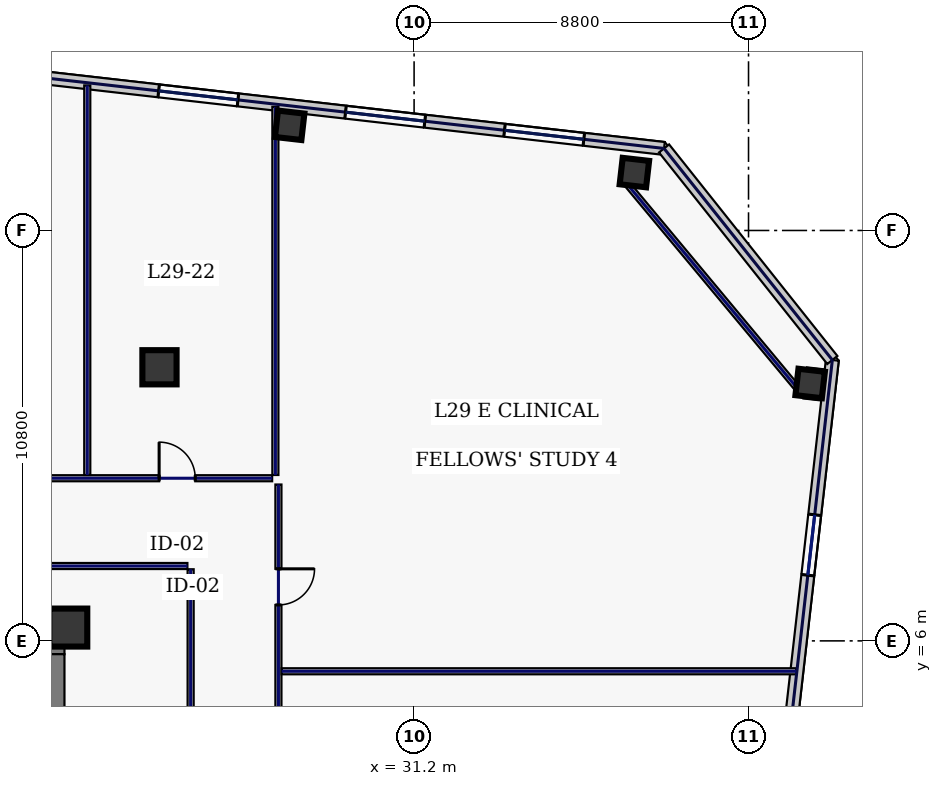
"""IFC4 building model, lengths in metres.
Left out: names, types, materials, properties, quantities, classifications, styles, units other than length and angle.
Written with IfcOpenShell. Run it as: python <this file> out.ifc"""

import sys

from ifc_helpers import new_model, si_unit, direction, frame, frame_2d, origin, origin_2d, place, context, subcontext, project, spatial, rectangle, hollow_rectangle, extrude, element, fill, save


model = new_model("IFC4")
c1 = context("Model", 3, precision=1e-05, world=origin(), true_north=direction((0.0, 1.0)))
c2 = subcontext(c1, "Body", "Model", "MODEL_VIEW")
j1 = project(units=[si_unit("LENGTHUNIT", "METRE"), si_unit("PLANEANGLEUNIT", "RADIAN")], contexts=[c1])
p1 = place(None, origin())
s1 = spatial("IfcSite", under=j1, at=p1, CompositionType="ELEMENT")
p2 = place(p1, origin())
s2 = spatial("IfcBuilding", under=s1, at=p2, CompositionType="ELEMENT")
p3 = place(p2, frame((0.0, 0.0, 129.4)))
s3 = spatial("IfcBuildingStorey", under=s2, at=p3, CompositionType="ELEMENT", Elevation=129.4)
p4 = place(p3, frame((10.45, 6.0, 0.0), z_axis=(0.0, 0.0, 1.0), x_axis=(1.0, 0.0, 0.0)))
e1 = element("IfcWall", 1, at=p4, inside=s3, PredefinedType="SHEAR", context=c2, shape_type="SweptSolid", body=[
    extrude(rectangle(XDim=11.55, YDim=0.7, at=frame_2d((5.775, 0.0))), origin(), (0.0, 0.0, 1.0), 3.74),
])
p5 = place(p3, frame((21.6, -5.65, 0.0), z_axis=(0.0, 0.0, 1.0), x_axis=(0.0, 1.0, 0.0)))
e2 = element("IfcWall", 2, at=p5, inside=s3, PredefinedType="SHEAR", context=c2, shape_type="SweptSolid", body=[
    extrude(rectangle(XDim=11.3, YDim=0.8, at=frame_2d((5.65, 0.0))), origin(), (0.0, 0.0, 1.0), 3.74),
])
p6 = place(p3, frame((22.1, 6.35, 0.0), z_axis=(0.0, 0.0, 1.0), x_axis=(1.0, 0.0, 0.0)))
e3 = element("IfcColumn", 3, at=p6, inside=s3, PredefinedType="COLUMN", context=c2, shape_type="SweptSolid", body=[
    extrude(hollow_rectangle(XDim=1.0, YDim=1.0, WallThickness=0.045, at=origin_2d()), origin(), (0.0, 0.0, 1.0), 3.74),
])
p7 = place(p3, frame((24.5, 13.2, 0.0), z_axis=(0.0, 0.0, 1.0), x_axis=(1.0, 0.0, 0.0)))
e4 = element("IfcColumn", 4, at=p7, inside=s3, PredefinedType="COLUMN", context=c2, shape_type="SweptSolid", body=[
    extrude(hollow_rectangle(XDim=0.9, YDim=0.9, WallThickness=0.04, at=origin_2d()), origin(), (0.0, 0.0, 1.0), 3.74),
])
for number, where, z_axis, x_axis in (
    (5, (36.997, 18.323, 0.0), (0.0, 0.0, 1.0), (0.994, -0.113, 0.0)),
    (6, (27.926, 19.568, 0.0), (0.0, 0.0, 1.0), (0.994, -0.113, 0.0)),
    (7, (41.622, 12.774, 0.0), (0.0, 0.0, 1.0), (0.994, -0.113, 0.0)),
):
    element("IfcColumn", number, at=place(p3, frame(where, z_axis=z_axis, x_axis=x_axis)), inside=s3, PredefinedType="COLUMN", context=c2, shape_type="SweptSolid", body=[
        extrude(hollow_rectangle(XDim=0.7, YDim=0.7, WallThickness=0.032, at=origin_2d()), origin(), (0.0, 0.0, 1.0), 3.74),
    ])
p8 = place(p3, frame((37.777, 18.958, 0.0), z_axis=(0.0, 0.0, 1.0), x_axis=(-0.993571362037, 0.113207546299, 0.0)))
e8 = element("IfcWall", 8, at=p8, inside=s3, PredefinedType="STANDARD", context=c2, shape_type="SweptSolid", body=[
    extrude(rectangle(XDim=21.223, YDim=0.34, at=frame_2d((10.611, 0.0))), origin(), (0.0, 0.0, 1.0), 3.74),
])
p9 = place(p8, frame((16.756, 0.0, 0.67)))
e9 = element("IfcOpeningElement", 9, at=p9, cuts=e8, PredefinedType="OPENING", context=c2, shape_type="SweptSolid", body=[
    extrude(rectangle(XDim=0.85, YDim=1.85, at=frame_2d((0.425, 0.925))), frame((0.0, 0.18, 0.0), z_axis=(0.0, -1.0, 0.0), x_axis=(1.0, 0.0, 0.0)), (0.0, 0.0, 1.0), 0.36),
])
p10 = place(p8, frame((11.285, 0.0, 0.67)))
e10 = element("IfcOpeningElement", 10, at=p10, cuts=e8, PredefinedType="OPENING", context=c2, shape_type="SweptSolid", body=[
    extrude(rectangle(XDim=2.1, YDim=2.2, at=frame_2d((1.05, 1.1))), frame((0.0, 0.18, 0.0), z_axis=(0.0, -1.0, 0.0), x_axis=(1.0, 0.0, 0.0)), (0.0, 0.0, 1.0), 0.36),
])
p11 = place(p8, frame((6.336, 0.0, 0.67)))
e11 = element("IfcOpeningElement", 11, at=p11, cuts=e8, PredefinedType="OPENING", context=c2, shape_type="SweptSolid", body=[
    extrude(rectangle(XDim=2.1, YDim=2.2, at=frame_2d((1.05, 1.1))), frame((0.0, 0.18, 0.0), z_axis=(0.0, -1.0, 0.0), x_axis=(1.0, 0.0, 0.0)), (0.0, 0.0, 1.0), 0.36),
])
p12 = place(p8, frame((2.125, 0.0, 0.67)))
e12 = element("IfcOpeningElement", 12, at=p12, cuts=e8, PredefinedType="OPENING", context=c2, shape_type="SweptSolid", body=[
    extrude(rectangle(XDim=2.1, YDim=2.2, at=frame_2d((1.05, 1.1))), frame((0.0, 0.18, 0.0), z_axis=(0.0, -1.0, 0.0), x_axis=(1.0, 0.0, 0.0)), (0.0, 0.0, 1.0), 0.36),
])
p13 = place(p3, frame((37.768, -25.556, 0.0), z_axis=(0.0, 0.0, 1.0), x_axis=(0.113201605824, 0.993572038877, 0.0)))
e13 = element("IfcWall", 13, at=p13, inside=s3, PredefinedType="STANDARD", context=c2, shape_type="SweptSolid", body=[
    extrude(rectangle(XDim=39.2, YDim=0.34, at=frame_2d((19.6, 0.0))), origin(), (0.0, 0.0, 1.0), 3.74),
])
p14 = place(p13, frame((4.1, 0.0, 0.58)))
e14 = element("IfcOpeningElement", 14, at=p14, cuts=e13, PredefinedType="OPENING", context=c2, shape_type="SweptSolid", body=[
    extrude(rectangle(XDim=1.6, YDim=2.3, at=frame_2d((0.8, 1.15))), frame((0.0, 0.18, 0.0), z_axis=(0.0, -1.0, 0.0), x_axis=(1.0, 0.0, 0.0)), (0.0, 0.0, 1.0), 0.36),
])
p15 = place(p13, frame((13.9, 0.0, 0.58)))
e15 = element("IfcOpeningElement", 15, at=p15, cuts=e13, PredefinedType="OPENING", context=c2, shape_type="SweptSolid", body=[
    extrude(rectangle(XDim=1.6, YDim=2.3, at=frame_2d((0.8, 1.15))), frame((0.0, 0.18, 0.0), z_axis=(0.0, -1.0, 0.0), x_axis=(1.0, 0.0, 0.0)), (0.0, 0.0, 1.0), 0.36),
])
p16 = place(p13, frame((23.35, 0.0, 0.75)))
e16 = element("IfcOpeningElement", 16, at=p16, cuts=e13, PredefinedType="OPENING", context=c2, shape_type="SweptSolid", body=[
    extrude(rectangle(XDim=0.85, YDim=1.85, at=frame_2d((0.425, 0.925))), frame((0.0, 0.18, 0.0), z_axis=(0.0, -1.0, 0.0), x_axis=(1.0, 0.0, 0.0)), (0.0, 0.0, 1.0), 0.36),
])
p17 = place(p13, frame((33.5, 0.0, 0.58)))
e17 = element("IfcOpeningElement", 17, at=p17, cuts=e13, PredefinedType="OPENING", context=c2, shape_type="SweptSolid", body=[
    extrude(rectangle(XDim=1.6, YDim=2.3, at=frame_2d((0.8, 1.15))), frame((0.0, 0.18, 0.0), z_axis=(0.0, -1.0, 0.0), x_axis=(1.0, 0.0, 0.0)), (0.0, 0.0, 1.0), 0.36),
])
p18 = place(p3, frame((42.206, 13.392, 0.0), z_axis=(0.0, 0.0, 1.0), x_axis=(-0.622524521309, 0.782600294128, 0.0)))
e18 = element("IfcWall", 18, at=p18, inside=s3, PredefinedType="STANDARD", context=c2, shape_type="SweptSolid", body=[
    extrude(rectangle(XDim=7.113, YDim=0.34, at=frame_2d((3.557, 0.0))), origin(), (0.0, 0.0, 1.0), 3.74),
])
p19 = place(p3, frame((41.361, 12.556, 0.0), z_axis=(0.0, 0.0, 1.0), x_axis=(-0.640217638562, 0.768193579298, 0.0)))
e19 = element("IfcWall", 19, at=p19, inside=s3, PredefinedType="PARTITIONING", context=c2, shape_type="SweptSolid", body=[
    extrude(rectangle(XDim=7.224, YDim=0.16, at=frame_2d((3.612, 0.0))), origin(), (0.0, 0.0, 1.0), 3.74),
])
p20 = place(p3, frame((-27.465, 10.28, 0.0), z_axis=(0.0, 0.0, 1.0), x_axis=(1.0, 0.0, 0.0)))
e20 = element("IfcWall", 20, at=p20, inside=s3, PredefinedType="PARTITIONING", context=c2, shape_type="SweptSolid", body=[
    extrude(rectangle(XDim=54.93, YDim=0.16, at=frame_2d((27.465, 0.0))), origin(), (0.0, 0.0, 1.0), 3.74),
])
p21 = place(p20, frame((1.869, 0.0, 0.0)))
e21 = element("IfcOpeningElement", 21, at=p21, cuts=e20, PredefinedType="OPENING", context=c2, shape_type="SweptSolid", body=[
    extrude(rectangle(XDim=1.3, YDim=2.2, at=frame_2d((0.65, 1.1))), frame((0.0, 0.09, 0.0), z_axis=(0.0, -1.0, 0.0), x_axis=(1.0, 0.0, 0.0)), (0.0, 0.0, 1.0), 0.18),
])
p22 = place(p20, frame((7.1, 0.0, 0.0)))
e22 = element("IfcOpeningElement", 22, at=p22, cuts=e20, PredefinedType="OPENING", context=c2, shape_type="SweptSolid", body=[
    extrude(rectangle(XDim=0.95, YDim=2.2, at=frame_2d((0.475, 1.1))), frame((0.0, 0.09, 0.0), z_axis=(0.0, -1.0, 0.0), x_axis=(1.0, 0.0, 0.0)), (0.0, 0.0, 1.0), 0.18),
])
p23 = place(p20, frame((12.5, 0.0, 0.0)))
e23 = element("IfcOpeningElement", 23, at=p23, cuts=e20, PredefinedType="OPENING", context=c2, shape_type="SweptSolid", body=[
    extrude(rectangle(XDim=0.95, YDim=2.2, at=frame_2d((0.475, 1.1))), frame((0.0, 0.09, 0.0), z_axis=(0.0, -1.0, 0.0), x_axis=(1.0, 0.0, 0.0)), (0.0, 0.0, 1.0), 0.18),
])
p24 = place(p20, frame((18.325, 0.0, 0.0)))
e24 = element("IfcOpeningElement", 24, at=p24, cuts=e20, PredefinedType="OPENING", context=c2, shape_type="SweptSolid", body=[
    extrude(rectangle(XDim=0.95, YDim=2.2, at=frame_2d((0.475, 1.1))), frame((0.0, 0.09, 0.0), z_axis=(0.0, -1.0, 0.0), x_axis=(1.0, 0.0, 0.0)), (0.0, 0.0, 1.0), 0.18),
])
p25 = place(p20, frame((24.575, 0.0, 0.0)))
e25 = element("IfcOpeningElement", 25, at=p25, cuts=e20, PredefinedType="OPENING", context=c2, shape_type="SweptSolid", body=[
    extrude(rectangle(XDim=0.95, YDim=2.2, at=frame_2d((0.475, 1.1))), frame((0.0, 0.09, 0.0), z_axis=(0.0, -1.0, 0.0), x_axis=(1.0, 0.0, 0.0)), (0.0, 0.0, 1.0), 0.18),
])
p26 = place(p20, frame((30.69, 0.0, 0.0)))
e26 = element("IfcOpeningElement", 26, at=p26, cuts=e20, PredefinedType="OPENING", context=c2, shape_type="SweptSolid", body=[
    extrude(rectangle(XDim=1.3, YDim=2.2, at=frame_2d((0.65, 1.1))), frame((0.0, 0.09, 0.0), z_axis=(0.0, -1.0, 0.0), x_axis=(1.0, 0.0, 0.0)), (0.0, 0.0, 1.0), 0.18),
])
p27 = place(p20, frame((37.02, 0.0, 0.0)))
e27 = element("IfcOpeningElement", 27, at=p27, cuts=e20, PredefinedType="OPENING", context=c2, shape_type="SweptSolid", body=[
    extrude(rectangle(XDim=1.3, YDim=2.2, at=frame_2d((0.65, 1.1))), frame((0.0, 0.09, 0.0), z_axis=(0.0, -1.0, 0.0), x_axis=(1.0, 0.0, 0.0)), (0.0, 0.0, 1.0), 0.18),
])
p28 = place(p20, frame((44.73, 0.0, 0.0)))
e28 = element("IfcOpeningElement", 28, at=p28, cuts=e20, PredefinedType="OPENING", context=c2, shape_type="SweptSolid", body=[
    extrude(rectangle(XDim=1.3, YDim=2.2, at=frame_2d((0.65, 1.1))), frame((0.0, 0.09, 0.0), z_axis=(0.0, -1.0, 0.0), x_axis=(1.0, 0.0, 0.0)), (0.0, 0.0, 1.0), 0.18),
])
p29 = place(p20, frame((51.956, 0.0, 0.0)))
e29 = element("IfcOpeningElement", 29, at=p29, cuts=e20, PredefinedType="OPENING", context=c2, shape_type="SweptSolid", body=[
    extrude(rectangle(XDim=0.95, YDim=2.2, at=frame_2d((0.475, 1.1))), frame((0.0, 0.09, 0.0), z_axis=(0.0, -1.0, 0.0), x_axis=(1.0, 0.0, 0.0)), (0.0, 0.0, 1.0), 0.18),
])
p30 = place(p3, frame((27.63, 10.115, 0.0), z_axis=(0.0, 0.0, 1.0), x_axis=(0.0, -1.0, 0.0)))
e30 = element("IfcWall", 30, at=p30, inside=s3, PredefinedType="PARTITIONING", context=c2, shape_type="SweptSolid", body=[
    extrude(rectangle(XDim=20.13, YDim=0.16, at=frame_2d((10.065, 0.0))), origin(), (0.0, 0.0, 1.0), 3.74),
])
p31 = place(p30, frame((17.181, 0.0, 0.0)))
e31 = element("IfcOpeningElement", 31, at=p31, cuts=e30, PredefinedType="OPENING", context=c2, shape_type="SweptSolid", body=[
    extrude(rectangle(XDim=0.95, YDim=2.2, at=frame_2d((0.475, 1.1))), frame((0.0, 0.09, 0.0), z_axis=(0.0, -1.0, 0.0), x_axis=(1.0, 0.0, 0.0)), (0.0, 0.0, 1.0), 0.18),
])
p32 = place(p30, frame((12.325, 0.0, 0.0)))
e32 = element("IfcOpeningElement", 32, at=p32, cuts=e30, PredefinedType="OPENING", context=c2, shape_type="SweptSolid", body=[
    extrude(rectangle(XDim=0.95, YDim=2.2, at=frame_2d((0.475, 1.1))), frame((0.0, 0.09, 0.0), z_axis=(0.0, -1.0, 0.0), x_axis=(1.0, 0.0, 0.0)), (0.0, 0.0, 1.0), 0.18),
])
p33 = place(p30, frame((7.125, 0.0, 0.0)))
e33 = element("IfcOpeningElement", 33, at=p33, cuts=e30, PredefinedType="OPENING", context=c2, shape_type="SweptSolid", body=[
    extrude(rectangle(XDim=0.95, YDim=2.2, at=frame_2d((0.475, 1.1))), frame((0.0, 0.09, 0.0), z_axis=(0.0, -1.0, 0.0), x_axis=(1.0, 0.0, 0.0)), (0.0, 0.0, 1.0), 0.18),
])
p34 = place(p30, frame((2.219, 0.0, 0.0)))
e34 = element("IfcOpeningElement", 34, at=p34, cuts=e30, PredefinedType="OPENING", context=c2, shape_type="SweptSolid", body=[
    extrude(rectangle(XDim=0.95, YDim=2.2, at=frame_2d((0.475, 1.1))), frame((0.0, 0.09, 0.0), z_axis=(0.0, -1.0, 0.0), x_axis=(1.0, 0.0, 0.0)), (0.0, 0.0, 1.0), 0.18),
])
p35 = place(p3, frame((25.235, 7.97, 0.0), z_axis=(0.0, 0.0, 1.0), x_axis=(-1.0, 0.0, 0.0)))
e35 = element("IfcWall", 35, at=p35, inside=s3, PredefinedType="PARTITIONING", context=c2, shape_type="SweptSolid", body=[
    extrude(rectangle(XDim=14.57, YDim=0.16, at=frame_2d((7.285, 0.0))), origin(), (0.0, 0.0, 1.0), 3.74),
])
p36 = place(p3, frame((25.32, -7.785, 0.0), z_axis=(0.0, 0.0, 1.0), x_axis=(0.0, 1.0, 0.0)))
e36 = element("IfcWall", 36, at=p36, inside=s3, PredefinedType="PARTITIONING", context=c2, shape_type="SweptSolid", body=[
    extrude(rectangle(XDim=15.67, YDim=0.16, at=frame_2d((7.835, 0.0))), origin(), (0.0, 0.0, 1.0), 3.74),
])
p37 = place(p3, frame((27.55, 10.365, 0.0), z_axis=(0.0, 0.0, 1.0), x_axis=(0.0, 1.0, 0.0)))
e37 = element("IfcWall", 37, at=p37, inside=s3, PredefinedType="PARTITIONING", context=c2, shape_type="SweptSolid", body=[
    extrude(rectangle(XDim=9.688, YDim=0.16, at=frame_2d((4.844, 0.0))), origin(), (0.0, 0.0, 1.0), 3.74),
])
p38 = place(p3, frame((22.6, 10.365, 0.0), z_axis=(0.0, 0.0, 1.0), x_axis=(0.0, 1.0, 0.0)))
e38 = element("IfcWall", 38, at=p38, inside=s3, PredefinedType="PARTITIONING", context=c2, shape_type="SweptSolid", body=[
    extrude(rectangle(XDim=10.252, YDim=0.16, at=frame_2d((5.126, 0.0))), origin(), (0.0, 0.0, 1.0), 3.74),
])
p39 = place(p3, frame((27.715, 5.2, 0.0), z_axis=(0.0, 0.0, 1.0), x_axis=(1.0, 0.0, 0.0)))
e39 = element("IfcWall", 39, at=p39, inside=s3, PredefinedType="PARTITIONING", context=c2, shape_type="SweptSolid", body=[
    extrude(rectangle(XDim=13.537, YDim=0.16, at=frame_2d((6.769, 0.0))), origin(), (0.0, 0.0, 1.0), 3.74),
])
p40 = place(p10, origin())
e40 = element("IfcWindow", 40, at=p40, inside=s3, PartitioningType="SINGLE_PANEL", PredefinedType="WINDOW", context=c2, shape_type="SweptSolid", body=[
    extrude(rectangle(XDim=2.1, YDim=2.2, at=frame_2d((1.05, 1.1))), frame((0.0, 0.03, 0.0), z_axis=(0.0, -1.0, 0.0), x_axis=(1.0, 0.0, 0.0)), (0.0, 0.0, 1.0), 0.06),
])
fill(e10, e40)
p41 = place(p11, origin())
e41 = element("IfcWindow", 41, at=p41, inside=s3, PartitioningType="SINGLE_PANEL", PredefinedType="WINDOW", context=c2, shape_type="SweptSolid", body=[
    extrude(rectangle(XDim=2.1, YDim=2.2, at=frame_2d((1.05, 1.1))), frame((0.0, 0.03, 0.0), z_axis=(0.0, -1.0, 0.0), x_axis=(1.0, 0.0, 0.0)), (0.0, 0.0, 1.0), 0.06),
])
fill(e11, e41)
p42 = place(p12, origin())
e42 = element("IfcWindow", 42, at=p42, inside=s3, PartitioningType="SINGLE_PANEL", PredefinedType="WINDOW", context=c2, shape_type="SweptSolid", body=[
    extrude(rectangle(XDim=2.1, YDim=2.2, at=frame_2d((1.05, 1.1))), frame((0.0, 0.03, 0.0), z_axis=(0.0, -1.0, 0.0), x_axis=(1.0, 0.0, 0.0)), (0.0, 0.0, 1.0), 0.06),
])
fill(e12, e42)
p43 = place(p17, origin())
e43 = element("IfcWindow", 43, at=p43, inside=s3, PartitioningType="SINGLE_PANEL", PredefinedType="WINDOW", context=c2, shape_type="SweptSolid", body=[
    extrude(rectangle(XDim=1.6, YDim=2.3, at=frame_2d((0.8, 1.15))), frame((0.0, 0.03, 0.0), z_axis=(0.0, -1.0, 0.0), x_axis=(1.0, 0.0, 0.0)), (0.0, 0.0, 1.0), 0.06),
])
fill(e17, e43)
p44 = place(p29, origin())
e44 = element("IfcDoor", 44, at=p44, inside=s3, OperationType="SINGLE_SWING_LEFT", PredefinedType="DOOR", context=c2, shape_type="SweptSolid", body=[
    extrude(rectangle(XDim=0.95, YDim=2.2, at=frame_2d((0.475, 1.1))), frame((0.0, 0.025, 0.0), z_axis=(0.0, -1.0, 0.0), x_axis=(1.0, 0.0, 0.0)), (0.0, 0.0, 1.0), 0.05),
])
fill(e29, e44)
p45 = place(p34, origin())
e45 = element("IfcDoor", 45, at=p45, inside=s3, OperationType="SINGLE_SWING_LEFT", PredefinedType="DOOR", context=c2, shape_type="SweptSolid", body=[
    extrude(rectangle(XDim=0.95, YDim=2.2, at=frame_2d((0.475, 1.1))), frame((0.0, 0.025, 0.0), z_axis=(0.0, -1.0, 0.0), x_axis=(1.0, 0.0, 0.0)), (0.0, 0.0, 1.0), 0.05),
])
fill(e34, e45)
save(model, sys.argv[1])
